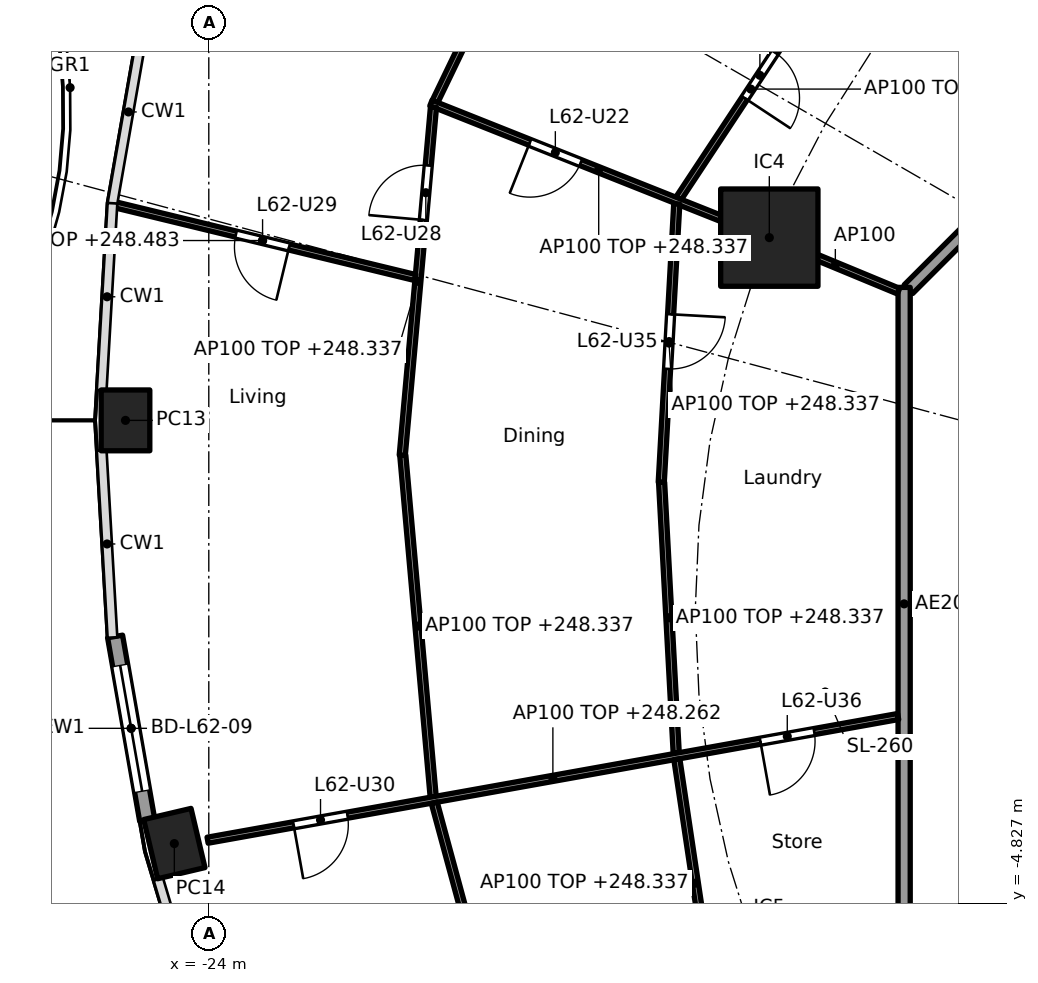
"""IFC4 building model, lengths in metres.
Left out: names, types, materials, properties, quantities, classifications, styles, units other than length and angle.
Written with IfcOpenShell. Run it as: python <this file> out.ifc"""

import sys

from ifc_helpers import new_model, si_unit, direction, frame, frame_2d, origin, origin_2d, place, context, subcontext, project, spatial, rectangle, hollow_rectangle, extrude, element, fill, save


model = new_model("IFC4")
c1 = context("Model", 3, precision=1e-05, world=origin(), true_north=direction((0.0, 1.0)))
c2 = subcontext(c1, "Body", "Model", "MODEL_VIEW")
j1 = project(units=[si_unit("LENGTHUNIT", "METRE"), si_unit("PLANEANGLEUNIT", "RADIAN")], contexts=[c1])
p1 = place(None, origin())
s1 = spatial("IfcSite", under=j1, at=p1, CompositionType="ELEMENT")
p2 = place(p1, origin())
s2 = spatial("IfcBuilding", under=s1, at=p2, CompositionType="ELEMENT")
p3 = place(p2, frame((0.0, 0.0, 245.5)))
s3 = spatial("IfcBuildingStorey", under=s2, at=p3, CompositionType="ELEMENT", Elevation=245.5)
for number, where, z_axis, x_axis in (
    (1, (-25.37, 3.118, 0.0), (0.0, 0.0, 1.0), (0.0, -1.0, 0.0)),
    (2, (-24.567, -3.842, 0.0), (0.0, 0.0, 1.0), (0.229, -0.973, 0.0)),
):
    element("IfcColumn", number, at=place(p3, frame(where, z_axis=z_axis, x_axis=x_axis)), inside=s3, PredefinedType="COLUMN", context=c2, shape_type="SweptSolid", body=[
        extrude(hollow_rectangle(XDim=1.0, YDim=0.8, WallThickness=0.032, at=origin_2d()), origin(), (0.0, 0.0, 1.0), 3.7),
    ])
p4 = place(p3, frame((-14.782, 6.123, 0.0), z_axis=(0.0, 0.0, 1.0), x_axis=(1.0, 0.0, 0.0)))
e3 = element("IfcColumn", 3, at=p4, inside=s3, PredefinedType="COLUMN", context=c2, shape_type="SweptSolid", body=[
    extrude(rectangle(XDim=1.6, YDim=1.6, at=origin_2d()), origin(), (0.0, 0.0, 1.0), 3.7),
])
p5 = place(p3, frame((-25.013, -3.457, 0.0), z_axis=(0.0, 0.0, 1.0), x_axis=(-0.172241318156, 0.985054784426, 0.0)))
e4 = element("IfcWall", 4, at=p5, inside=s3, PredefinedType="SOLIDWALL", context=c2, shape_type="SweptSolid", body=[
    extrude(rectangle(XDim=3.067, YDim=0.25, at=frame_2d((1.534, 0.0))), origin(), (0.0, 0.0, 1.0), 3.44),
])
p6 = place(p5, frame((0.484, 0.0, 0.0)))
e5 = element("IfcOpeningElement", 5, at=p6, cuts=e4, PredefinedType="OPENING", context=c2, shape_type="SweptSolid", body=[
    extrude(rectangle(XDim=2.1, YDim=2.4, at=frame_2d((1.05, 1.2))), frame((0.0, 0.135, 0.0), z_axis=(0.0, -1.0, 0.0), x_axis=(1.0, 0.0, 0.0)), (0.0, 0.0, 1.0), 0.27),
])
p7 = place(p3, frame((-5.275, 12.494, 0.0), z_axis=(0.0, 0.0, 1.0), x_axis=(-0.707106781187, -0.707106781187, 0.0)))
e6 = element("IfcWall", 6, at=p7, inside=s3, PredefinedType="PARTITIONING", context=c2, shape_type="SweptSolid", body=[
    extrude(rectangle(XDim=10.209, YDim=0.2, at=frame_2d((5.104, 0.0))), origin(), (0.0, 0.0, 1.0), 3.44),
])
p8 = place(p3, frame((-12.565, 5.304, 0.0), z_axis=(0.0, 0.0, 1.0), x_axis=(0.0, -1.0, 0.0)))
e7 = element("IfcWall", 7, at=p8, inside=s3, PredefinedType="PARTITIONING", context=c2, shape_type="SweptSolid", body=[
    extrude(rectangle(XDim=10.409, YDim=0.2, at=frame_2d((5.205, 0.0))), origin(), (0.0, 0.0, 1.0), 3.44),
])
p9 = place(p3, frame((-13.899, 10.363, 0.0), z_axis=(0.0, 0.0, 1.0), x_axis=(-0.551268538455, -0.834327872308, 0.0)))
e8 = element("IfcWall", 8, at=p9, inside=s3, PredefinedType="PARTITIONING", context=c2, shape_type="SweptSolid", body=[
    extrude(rectangle(XDim=4.307, YDim=0.1, at=frame_2d((2.154, 0.0))), origin(), (0.0, 0.0, 1.0), 2.837),
])
p10 = place(p9, frame((1.433, 0.0, 0.0)))
e9 = element("IfcOpeningElement", 9, at=p10, cuts=e8, PredefinedType="OPENING", context=c2, shape_type="SweptSolid", body=[
    extrude(rectangle(XDim=0.9, YDim=2.1, at=frame_2d((0.45, 1.05))), frame((0.0, 0.06, 0.0), z_axis=(0.0, -1.0, 0.0), x_axis=(1.0, 0.0, 0.0)), (0.0, 0.0, 1.0), 0.12),
])
p11 = place(p3, frame((-17.904, 13.289, 0.0), z_axis=(0.0, 0.0, 1.0), x_axis=(-0.434292070406, -0.900772111903, 0.0)))
e10 = element("IfcWall", 10, at=p11, inside=s3, PredefinedType="PARTITIONING", context=c2, shape_type="SweptSolid", body=[
    extrude(rectangle(XDim=5.469, YDim=0.1, at=frame_2d((2.734, 0.0))), origin(), (0.0, 0.0, 1.0), 2.837),
])
p12 = place(p3, frame((-12.657, 5.243, 0.0), z_axis=(0.0, 0.0, 1.0), x_axis=(-0.923871314276, 0.382703272338, 0.0)))
e11 = element("IfcWall", 11, at=p12, inside=s3, PredefinedType="PARTITIONING", context=c2, shape_type="SweptSolid", body=[
    extrude(rectangle(XDim=2.249, YDim=0.1, at=frame_2d((1.125, 0.0))), origin(), (0.0, 0.0, 1.0), 3.44),
])
p13 = place(p3, frame((-14.829, 6.141, 0.0), z_axis=(0.0, 0.0, 1.0), x_axis=(-0.92919221305, 0.369596849563, 0.0)))
e12 = element("IfcWall", 12, at=p13, inside=s3, PredefinedType="PARTITIONING", context=c2, shape_type="SweptSolid", body=[
    extrude(rectangle(XDim=5.939, YDim=0.1, at=frame_2d((2.97, 0.0))), origin(), (0.0, 0.0, 1.0), 2.837),
])
p14 = place(p13, frame((3.287, 0.0, 0.0)))
e13 = element("IfcOpeningElement", 13, at=p14, cuts=e12, PredefinedType="OPENING", context=c2, shape_type="SweptSolid", body=[
    extrude(rectangle(XDim=0.9, YDim=2.1, at=frame_2d((0.45, 1.05))), frame((0.0, 0.06, 0.0), z_axis=(0.0, -1.0, 0.0), x_axis=(1.0, 0.0, 0.0)), (0.0, 0.0, 1.0), 0.12),
])
p15 = place(p3, frame((-16.304, 6.677, 0.0), z_axis=(0.0, 0.0, 1.0), x_axis=(-0.055596844869, -0.998453299279, 0.0)))
e14 = element("IfcWall", 14, at=p15, inside=s3, PredefinedType="PARTITIONING", context=c2, shape_type="SweptSolid", body=[
    extrude(rectangle(XDim=4.584, YDim=0.1, at=frame_2d((2.292, 0.0))), origin(), (0.0, 0.0, 1.0), 2.837),
])
p16 = place(p15, frame((1.817, 0.0, 0.0)))
e15 = element("IfcOpeningElement", 15, at=p16, cuts=e14, PredefinedType="OPENING", context=c2, shape_type="SweptSolid", body=[
    extrude(rectangle(XDim=0.9, YDim=2.1, at=frame_2d((0.45, 1.05))), frame((0.0, 0.06, 0.0), z_axis=(0.0, -1.0, 0.0), x_axis=(1.0, 0.0, 0.0)), (0.0, 0.0, 1.0), 0.12),
])
p17 = place(p3, frame((-20.305, 8.268, 0.0), z_axis=(0.0, 0.0, 1.0), x_axis=(-0.089272015533, -0.996007282726, 0.0)))
e16 = element("IfcWall", 16, at=p17, inside=s3, PredefinedType="PARTITIONING", context=c2, shape_type="SweptSolid", body=[
    extrude(rectangle(XDim=5.749, YDim=0.1, at=frame_2d((2.874, 0.0))), origin(), (0.0, 0.0, 1.0), 2.837),
])
p18 = place(p17, frame((0.962, 0.0, 0.0)))
e17 = element("IfcOpeningElement", 17, at=p18, cuts=e16, PredefinedType="OPENING", context=c2, shape_type="SweptSolid", body=[
    extrude(rectangle(XDim=0.9, YDim=2.1, at=frame_2d((0.45, 1.05))), frame((0.0, 0.06, 0.0), z_axis=(0.0, -1.0, 0.0), x_axis=(1.0, 0.0, 0.0)), (0.0, 0.0, 1.0), 0.12),
])
p19 = place(p3, frame((-20.606, 5.467, 0.0), z_axis=(0.0, 0.0, 1.0), x_axis=(-0.971860928388, 0.235555377507, 0.0)))
e18 = element("IfcWall", 18, at=p19, inside=s3, PredefinedType="PARTITIONING", context=c2, shape_type="SweptSolid", body=[
    extrude(rectangle(XDim=5.165, YDim=0.1, at=frame_2d((2.582, 0.0))), origin(), (0.0, 0.0, 1.0), 2.983),
])
p20 = place(p19, frame((2.132, 0.0, 0.0)))
e19 = element("IfcOpeningElement", 19, at=p20, cuts=e18, PredefinedType="OPENING", context=c2, shape_type="SweptSolid", body=[
    extrude(rectangle(XDim=0.9, YDim=2.1, at=frame_2d((0.45, 1.05))), frame((0.0, 0.06, 0.0), z_axis=(0.0, -1.0, 0.0), x_axis=(1.0, 0.0, 0.0)), (0.0, 0.0, 1.0), 0.12),
])
p21 = place(p3, frame((-16.554, 2.1, 0.0), z_axis=(0.0, 0.0, 1.0), x_axis=(0.053945770239, -0.998543866775, 0.0)))
e20 = element("IfcWall", 20, at=p21, inside=s3, PredefinedType="PARTITIONING", context=c2, shape_type="SweptSolid", body=[
    extrude(rectangle(XDim=4.462, YDim=0.1, at=frame_2d((2.231, 0.0))), origin(), (0.0, 0.0, 1.0), 2.837),
])
p22 = place(p3, frame((-20.81, 2.542, 0.0), z_axis=(0.0, 0.0, 1.0), x_axis=(0.088621920298, -0.996065336834, 0.0)))
e21 = element("IfcWall", 21, at=p22, inside=s3, PredefinedType="PARTITIONING", context=c2, shape_type="SweptSolid", body=[
    extrude(rectangle(XDim=5.636, YDim=0.1, at=frame_2d((2.818, 0.0))), origin(), (0.0, 0.0, 1.0), 2.837),
])
p23 = place(p3, frame((-12.663, -1.752, 0.0), z_axis=(0.0, 0.0, 1.0), x_axis=(-0.98433012022, -0.176335516635, 0.0)))
e22 = element("IfcWall", 22, at=p23, inside=s3, PredefinedType="PARTITIONING", context=c2, shape_type="SweptSolid", body=[
    extrude(rectangle(XDim=11.537, YDim=0.1, at=frame_2d((5.769, 0.0))), origin(), (0.0, 0.0, 1.0), 2.762),
])
p24 = place(p23, frame((9.201, 0.0, 0.0)))
e23 = element("IfcOpeningElement", 23, at=p24, cuts=e22, PredefinedType="OPENING", context=c2, shape_type="SweptSolid", body=[
    extrude(rectangle(XDim=0.9, YDim=2.1, at=frame_2d((0.45, 1.05))), frame((0.0, 0.06, 0.0), z_axis=(0.0, -1.0, 0.0), x_axis=(1.0, 0.0, 0.0)), (0.0, 0.0, 1.0), 0.12),
])
p25 = place(p23, frame((1.403, 0.0, 0.0)))
e24 = element("IfcOpeningElement", 24, at=p25, cuts=e22, PredefinedType="OPENING", context=c2, shape_type="SweptSolid", body=[
    extrude(rectangle(XDim=0.9, YDim=2.1, at=frame_2d((0.45, 1.05))), frame((0.0, 0.06, 0.0), z_axis=(0.0, -1.0, 0.0), x_axis=(1.0, 0.0, 0.0)), (0.0, 0.0, 1.0), 0.12),
])
p26 = place(p3, frame((-16.303, -2.455, 0.0), z_axis=(0.0, 0.0, 1.0), x_axis=(0.147711951447, -0.9890304239, 0.0)))
e25 = element("IfcWall", 25, at=p26, inside=s3, PredefinedType="PARTITIONING", context=c2, shape_type="SweptSolid", body=[
    extrude(rectangle(XDim=4.122, YDim=0.1, at=frame_2d((2.061, 0.0))), origin(), (0.0, 0.0, 1.0), 2.837),
])
p27 = place(p3, frame((-20.292, -3.17, 0.0), z_axis=(0.0, 0.0, 1.0), x_axis=(0.26187906236, -0.965100697698, 0.0)))
e26 = element("IfcWall", 26, at=p27, inside=s3, PredefinedType="PARTITIONING", context=c2, shape_type="SweptSolid", body=[
    extrude(rectangle(XDim=5.356, YDim=0.1, at=frame_2d((2.678, 0.0))), origin(), (0.0, 0.0, 1.0), 2.837),
])
p28 = place(p27, frame((2.228, 0.0, 0.0)))
e27 = element("IfcOpeningElement", 27, at=p28, cuts=e26, PredefinedType="OPENING", context=c2, shape_type="SweptSolid", body=[
    extrude(rectangle(XDim=0.9, YDim=2.1, at=frame_2d((0.45, 1.05))), frame((0.0, 0.06, 0.0), z_axis=(0.0, -1.0, 0.0), x_axis=(1.0, 0.0, 0.0)), (0.0, 0.0, 1.0), 0.12),
])
p29 = place(p6, origin())
e28 = element("IfcDoor", 28, at=p29, inside=s3, OperationType="SLIDING_TO_LEFT", PredefinedType="DOOR", context=c2, shape_type="SweptSolid", body=[
    extrude(rectangle(XDim=2.1, YDim=2.4, at=frame_2d((1.05, 1.2))), frame((0.0, 0.025, 0.0), z_axis=(0.0, -1.0, 0.0), x_axis=(1.0, 0.0, 0.0)), (0.0, 0.0, 1.0), 0.05),
])
fill(e5, e28)
p30 = place(p14, origin())
e29 = element("IfcDoor", 29, at=p30, inside=s3, OperationType="SINGLE_SWING_RIGHT", PredefinedType="DOOR", context=c2, shape_type="SweptSolid", body=[
    extrude(rectangle(XDim=0.9, YDim=2.1, at=frame_2d((0.45, 1.05))), frame((0.0, 0.025, 0.0), z_axis=(0.0, -1.0, 0.0), x_axis=(1.0, 0.0, 0.0)), (0.0, 0.0, 1.0), 0.05),
])
fill(e13, e29)
p31 = place(p18, frame((0.9, 0.0, 0.0), x_axis=(-1.0, 0.0, 0.0)))
e30 = element("IfcDoor", 30, at=p31, inside=s3, OperationType="SINGLE_SWING_LEFT", PredefinedType="DOOR", context=c2, shape_type="SweptSolid", body=[
    extrude(rectangle(XDim=0.9, YDim=2.1, at=frame_2d((0.45, 1.05))), frame((0.0, 0.025, 0.0), z_axis=(0.0, -1.0, 0.0), x_axis=(1.0, 0.0, 0.0)), (0.0, 0.0, 1.0), 0.05),
])
fill(e17, e30)
p32 = place(p20, origin())
e31 = element("IfcDoor", 31, at=p32, inside=s3, OperationType="SINGLE_SWING_LEFT", PredefinedType="DOOR", context=c2, shape_type="SweptSolid", body=[
    extrude(rectangle(XDim=0.9, YDim=2.1, at=frame_2d((0.45, 1.05))), frame((0.0, 0.025, 0.0), z_axis=(0.0, -1.0, 0.0), x_axis=(1.0, 0.0, 0.0)), (0.0, 0.0, 1.0), 0.05),
])
fill(e19, e31)
p33 = place(p24, origin())
e32 = element("IfcDoor", 32, at=p33, inside=s3, OperationType="SINGLE_SWING_RIGHT", PredefinedType="DOOR", context=c2, shape_type="SweptSolid", body=[
    extrude(rectangle(XDim=0.9, YDim=2.1, at=frame_2d((0.45, 1.05))), frame((0.0, 0.025, 0.0), z_axis=(0.0, -1.0, 0.0), x_axis=(1.0, 0.0, 0.0)), (0.0, 0.0, 1.0), 0.05),
])
fill(e23, e32)
p34 = place(p10, origin())
e33 = element("IfcDoor", 33, at=p34, inside=s3, OperationType="SINGLE_SWING_RIGHT", PredefinedType="DOOR", context=c2, shape_type="SweptSolid", body=[
    extrude(rectangle(XDim=0.9, YDim=2.1, at=frame_2d((0.45, 1.05))), frame((0.0, 0.025, 0.0), z_axis=(0.0, -1.0, 0.0), x_axis=(1.0, 0.0, 0.0)), (0.0, 0.0, 1.0), 0.05),
])
fill(e9, e33)
p35 = place(p16, origin())
e34 = element("IfcDoor", 34, at=p35, inside=s3, OperationType="SINGLE_SWING_LEFT", PredefinedType="DOOR", context=c2, shape_type="SweptSolid", body=[
    extrude(rectangle(XDim=0.9, YDim=2.1, at=frame_2d((0.45, 1.05))), frame((0.0, 0.025, 0.0), z_axis=(0.0, -1.0, 0.0), x_axis=(1.0, 0.0, 0.0)), (0.0, 0.0, 1.0), 0.05),
])
fill(e15, e34)
p36 = place(p25, origin())
e35 = element("IfcDoor", 35, at=p36, inside=s3, OperationType="SINGLE_SWING_RIGHT", PredefinedType="DOOR", context=c2, shape_type="SweptSolid", body=[
    extrude(rectangle(XDim=0.9, YDim=2.1, at=frame_2d((0.45, 1.05))), frame((0.0, 0.025, 0.0), z_axis=(0.0, -1.0, 0.0), x_axis=(1.0, 0.0, 0.0)), (0.0, 0.0, 1.0), 0.05),
])
fill(e24, e35)
save(model, sys.argv[1])
